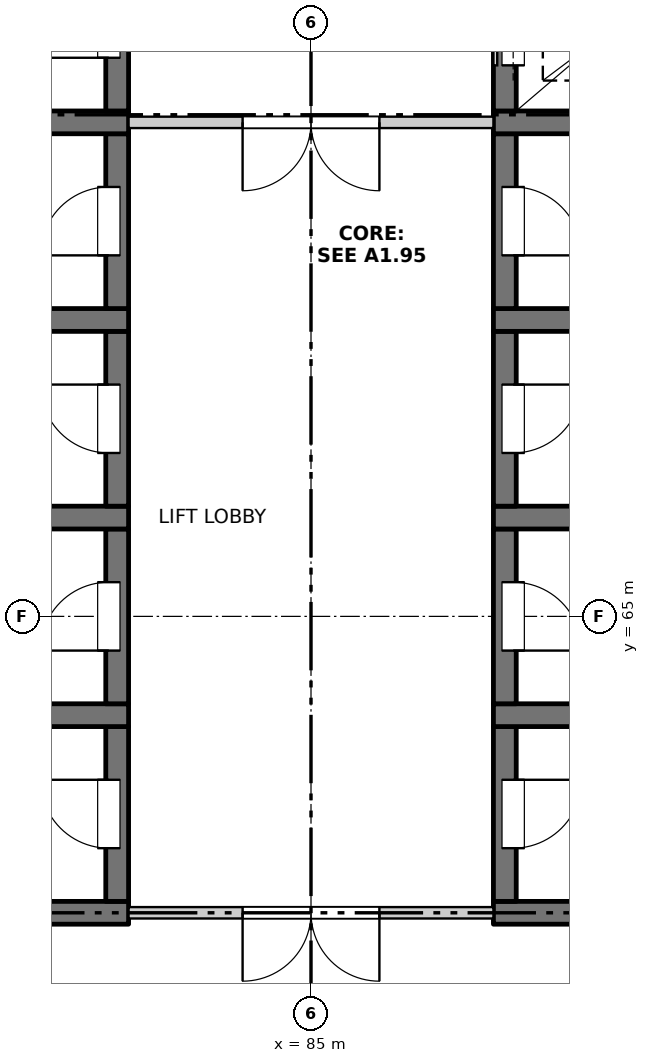
"""IFC4 building model, lengths in metres.
Left out: names, types, materials, properties, quantities, classifications, styles, units other than length and angle.
Written with IfcOpenShell. Run it as: python <this file> out.ifc"""

import sys

from ifc_helpers import new_model, si_unit, direction, frame, frame_2d, origin, place, context, subcontext, project, spatial, rectangle, extrude, element, fill, save


model = new_model("IFC4")
c1 = context("Model", 3, precision=1e-05, world=origin(), true_north=direction((0.0, 1.0)))
c2 = subcontext(c1, "Body", "Model", "MODEL_VIEW")
j1 = project(units=[si_unit("LENGTHUNIT", "METRE"), si_unit("PLANEANGLEUNIT", "RADIAN")], contexts=[c1])
p1 = place(None, origin())
s1 = spatial("IfcSite", under=j1, at=p1, CompositionType="ELEMENT")
p2 = place(p1, origin())
s2 = spatial("IfcBuilding", under=s1, at=p2, CompositionType="ELEMENT")
p3 = place(p2, frame((0.0, 0.0, 169.0)))
s3 = spatial("IfcBuildingStorey", under=s2, at=p3, CompositionType="ELEMENT", Elevation=169.0)
p4 = place(p3, frame((79.6, 61.1, -0.25), z_axis=(0.0, 0.0, 1.0), x_axis=(1.0, 0.0, 0.0)))
e1 = element("IfcWall", 1, at=p4, inside=s3, PredefinedType="SOLIDWALL", context=c2, shape_type="SweptSolid", body=[
    extrude(rectangle(XDim=3.0, YDim=0.3, at=frame_2d((1.5, 0.0))), origin(), (0.0, 0.0, 1.0), 3.35),
])
p5 = place(p3, frame((82.45, 61.25, -0.25), z_axis=(0.0, 0.0, 1.0), x_axis=(0.0, 1.0, 0.0)))
e2 = element("IfcWall", 2, at=p5, inside=s3, PredefinedType="SOLIDWALL", context=c2, shape_type="SweptSolid", body=[
    extrude(rectangle(XDim=2.3, YDim=0.3, at=frame_2d((1.15, 0.0))), origin(), (0.0, 0.0, 1.0), 3.35),
])
p6 = place(p5, frame((0.7, 0.0, 0.25)))
e3 = element("IfcOpeningElement", 3, at=p6, cuts=e2, PredefinedType="OPENING", context=c2, shape_type="SweptSolid", body=[
    extrude(rectangle(XDim=0.9, YDim=2.1, at=frame_2d((0.45, 1.05))), frame((0.0, 0.16, 0.0), z_axis=(0.0, -1.0, 0.0), x_axis=(1.0, 0.0, 0.0)), (0.0, 0.0, 1.0), 0.32),
])
p7 = place(p3, frame((79.6, 63.7, -0.25), z_axis=(0.0, 0.0, 1.0), x_axis=(1.0, 0.0, 0.0)))
e4 = element("IfcWall", 4, at=p7, inside=s3, PredefinedType="SOLIDWALL", context=c2, shape_type="SweptSolid", body=[
    extrude(rectangle(XDim=3.0, YDim=0.3, at=frame_2d((1.5, 0.0))), origin(), (0.0, 0.0, 1.0), 3.35),
])
p8 = place(p3, frame((82.45, 63.85, -0.25), z_axis=(0.0, 0.0, 1.0), x_axis=(0.0, 1.0, 0.0)))
e5 = element("IfcWall", 5, at=p8, inside=s3, PredefinedType="SOLIDWALL", context=c2, shape_type="SweptSolid", body=[
    extrude(rectangle(XDim=2.3, YDim=0.3, at=frame_2d((1.15, 0.0))), origin(), (0.0, 0.0, 1.0), 3.35),
])
p9 = place(p8, frame((0.7, 0.0, 0.25)))
e6 = element("IfcOpeningElement", 6, at=p9, cuts=e5, PredefinedType="OPENING", context=c2, shape_type="SweptSolid", body=[
    extrude(rectangle(XDim=0.9, YDim=2.1, at=frame_2d((0.45, 1.05))), frame((0.0, 0.16, 0.0), z_axis=(0.0, -1.0, 0.0), x_axis=(1.0, 0.0, 0.0)), (0.0, 0.0, 1.0), 0.32),
])
p10 = place(p3, frame((79.6, 66.3, -0.25), z_axis=(0.0, 0.0, 1.0), x_axis=(1.0, 0.0, 0.0)))
e7 = element("IfcWall", 7, at=p10, inside=s3, PredefinedType="SOLIDWALL", context=c2, shape_type="SweptSolid", body=[
    extrude(rectangle(XDim=3.0, YDim=0.3, at=frame_2d((1.5, 0.0))), origin(), (0.0, 0.0, 1.0), 3.35),
])
p11 = place(p3, frame((82.45, 66.45, -0.25), z_axis=(0.0, 0.0, 1.0), x_axis=(0.0, 1.0, 0.0)))
e8 = element("IfcWall", 8, at=p11, inside=s3, PredefinedType="SOLIDWALL", context=c2, shape_type="SweptSolid", body=[
    extrude(rectangle(XDim=2.3, YDim=0.3, at=frame_2d((1.15, 0.0))), origin(), (0.0, 0.0, 1.0), 3.35),
])
p12 = place(p11, frame((0.7, 0.0, 0.25)))
e9 = element("IfcOpeningElement", 9, at=p12, cuts=e8, PredefinedType="OPENING", context=c2, shape_type="SweptSolid", body=[
    extrude(rectangle(XDim=0.9, YDim=2.1, at=frame_2d((0.45, 1.05))), frame((0.0, 0.16, 0.0), z_axis=(0.0, -1.0, 0.0), x_axis=(1.0, 0.0, 0.0)), (0.0, 0.0, 1.0), 0.32),
])
p13 = place(p3, frame((79.6, 68.9, -0.25), z_axis=(0.0, 0.0, 1.0), x_axis=(1.0, 0.0, 0.0)))
e10 = element("IfcWall", 10, at=p13, inside=s3, PredefinedType="SOLIDWALL", context=c2, shape_type="SweptSolid", body=[
    extrude(rectangle(XDim=3.0, YDim=0.3, at=frame_2d((1.5, 0.0))), origin(), (0.0, 0.0, 1.0), 3.35),
])
p14 = place(p3, frame((82.45, 69.05, -0.25), z_axis=(0.0, 0.0, 1.0), x_axis=(0.0, 1.0, 0.0)))
e11 = element("IfcWall", 11, at=p14, inside=s3, PredefinedType="SOLIDWALL", context=c2, shape_type="SweptSolid", body=[
    extrude(rectangle(XDim=2.3, YDim=0.3, at=frame_2d((1.15, 0.0))), origin(), (0.0, 0.0, 1.0), 3.35),
])
p15 = place(p14, frame((0.7, 0.0, 0.25)))
e12 = element("IfcOpeningElement", 12, at=p15, cuts=e11, PredefinedType="OPENING", context=c2, shape_type="SweptSolid", body=[
    extrude(rectangle(XDim=0.9, YDim=2.1, at=frame_2d((0.45, 1.05))), frame((0.0, 0.16, 0.0), z_axis=(0.0, -1.0, 0.0), x_axis=(1.0, 0.0, 0.0)), (0.0, 0.0, 1.0), 0.32),
])
p16 = place(p3, frame((79.6, 71.5, -0.25), z_axis=(0.0, 0.0, 1.0), x_axis=(1.0, 0.0, 0.0)))
e13 = element("IfcWall", 13, at=p16, inside=s3, PredefinedType="SOLIDWALL", context=c2, shape_type="SweptSolid", body=[
    extrude(rectangle(XDim=3.0, YDim=0.3, at=frame_2d((1.5, 0.0))), origin(), (0.0, 0.0, 1.0), 3.35),
])
p17 = place(p3, frame((82.45, 71.65, -0.25), z_axis=(0.0, 0.0, 1.0), x_axis=(0.0, 1.0, 0.0)))
e14 = element("IfcWall", 14, at=p17, inside=s3, PredefinedType="SOLIDWALL", context=c2, shape_type="SweptSolid", body=[
    extrude(rectangle(XDim=2.3, YDim=0.3, at=frame_2d((1.15, 0.0))), origin(), (0.0, 0.0, 1.0), 3.35),
])
p18 = place(p17, frame((0.7, 0.0, 0.25)))
e15 = element("IfcOpeningElement", 15, at=p18, cuts=e14, PredefinedType="OPENING", context=c2, shape_type="SweptSolid", body=[
    extrude(rectangle(XDim=0.9, YDim=2.1, at=frame_2d((0.45, 1.05))), frame((0.0, 0.16, 0.0), z_axis=(0.0, -1.0, 0.0), x_axis=(1.0, 0.0, 0.0)), (0.0, 0.0, 1.0), 0.32),
])
p19 = place(p3, frame((87.4, 61.1, -0.25), z_axis=(0.0, 0.0, 1.0), x_axis=(1.0, 0.0, 0.0)))
e16 = element("IfcWall", 16, at=p19, inside=s3, PredefinedType="SOLIDWALL", context=c2, shape_type="SweptSolid", body=[
    extrude(rectangle(XDim=3.0, YDim=0.3, at=frame_2d((1.5, 0.0))), origin(), (0.0, 0.0, 1.0), 3.35),
])
p20 = place(p3, frame((87.55, 61.25, -0.25), z_axis=(0.0, 0.0, 1.0), x_axis=(0.0, 1.0, 0.0)))
e17 = element("IfcWall", 17, at=p20, inside=s3, PredefinedType="SOLIDWALL", context=c2, shape_type="SweptSolid", body=[
    extrude(rectangle(XDim=2.3, YDim=0.3, at=frame_2d((1.15, 0.0))), origin(), (0.0, 0.0, 1.0), 3.35),
])
p21 = place(p20, frame((0.7, 0.0, 0.25)))
e18 = element("IfcOpeningElement", 18, at=p21, cuts=e17, PredefinedType="OPENING", context=c2, shape_type="SweptSolid", body=[
    extrude(rectangle(XDim=0.9, YDim=2.1, at=frame_2d((0.45, 1.05))), frame((0.0, 0.16, 0.0), z_axis=(0.0, -1.0, 0.0), x_axis=(1.0, 0.0, 0.0)), (0.0, 0.0, 1.0), 0.32),
])
p22 = place(p3, frame((87.4, 63.7, -0.25), z_axis=(0.0, 0.0, 1.0), x_axis=(1.0, 0.0, 0.0)))
e19 = element("IfcWall", 19, at=p22, inside=s3, PredefinedType="SOLIDWALL", context=c2, shape_type="SweptSolid", body=[
    extrude(rectangle(XDim=3.0, YDim=0.3, at=frame_2d((1.5, 0.0))), origin(), (0.0, 0.0, 1.0), 3.35),
])
p23 = place(p3, frame((87.55, 63.85, -0.25), z_axis=(0.0, 0.0, 1.0), x_axis=(0.0, 1.0, 0.0)))
e20 = element("IfcWall", 20, at=p23, inside=s3, PredefinedType="SOLIDWALL", context=c2, shape_type="SweptSolid", body=[
    extrude(rectangle(XDim=2.3, YDim=0.3, at=frame_2d((1.15, 0.0))), origin(), (0.0, 0.0, 1.0), 3.35),
])
p24 = place(p23, frame((0.7, 0.0, 0.25)))
e21 = element("IfcOpeningElement", 21, at=p24, cuts=e20, PredefinedType="OPENING", context=c2, shape_type="SweptSolid", body=[
    extrude(rectangle(XDim=0.9, YDim=2.1, at=frame_2d((0.45, 1.05))), frame((0.0, 0.16, 0.0), z_axis=(0.0, -1.0, 0.0), x_axis=(1.0, 0.0, 0.0)), (0.0, 0.0, 1.0), 0.32),
])
p25 = place(p3, frame((87.4, 66.3, -0.25), z_axis=(0.0, 0.0, 1.0), x_axis=(1.0, 0.0, 0.0)))
e22 = element("IfcWall", 22, at=p25, inside=s3, PredefinedType="SOLIDWALL", context=c2, shape_type="SweptSolid", body=[
    extrude(rectangle(XDim=3.0, YDim=0.3, at=frame_2d((1.5, 0.0))), origin(), (0.0, 0.0, 1.0), 3.35),
])
p26 = place(p3, frame((87.55, 66.45, -0.25), z_axis=(0.0, 0.0, 1.0), x_axis=(0.0, 1.0, 0.0)))
e23 = element("IfcWall", 23, at=p26, inside=s3, PredefinedType="SOLIDWALL", context=c2, shape_type="SweptSolid", body=[
    extrude(rectangle(XDim=2.3, YDim=0.3, at=frame_2d((1.15, 0.0))), origin(), (0.0, 0.0, 1.0), 3.35),
])
p27 = place(p26, frame((0.7, 0.0, 0.25)))
e24 = element("IfcOpeningElement", 24, at=p27, cuts=e23, PredefinedType="OPENING", context=c2, shape_type="SweptSolid", body=[
    extrude(rectangle(XDim=0.9, YDim=2.1, at=frame_2d((0.45, 1.05))), frame((0.0, 0.16, 0.0), z_axis=(0.0, -1.0, 0.0), x_axis=(1.0, 0.0, 0.0)), (0.0, 0.0, 1.0), 0.32),
])
p28 = place(p3, frame((87.4, 68.9, -0.25), z_axis=(0.0, 0.0, 1.0), x_axis=(1.0, 0.0, 0.0)))
e25 = element("IfcWall", 25, at=p28, inside=s3, PredefinedType="SOLIDWALL", context=c2, shape_type="SweptSolid", body=[
    extrude(rectangle(XDim=3.0, YDim=0.3, at=frame_2d((1.5, 0.0))), origin(), (0.0, 0.0, 1.0), 3.35),
])
p29 = place(p3, frame((87.55, 69.05, -0.25), z_axis=(0.0, 0.0, 1.0), x_axis=(0.0, 1.0, 0.0)))
e26 = element("IfcWall", 26, at=p29, inside=s3, PredefinedType="SOLIDWALL", context=c2, shape_type="SweptSolid", body=[
    extrude(rectangle(XDim=2.3, YDim=0.3, at=frame_2d((1.15, 0.0))), origin(), (0.0, 0.0, 1.0), 3.35),
])
p30 = place(p29, frame((0.7, 0.0, 0.25)))
e27 = element("IfcOpeningElement", 27, at=p30, cuts=e26, PredefinedType="OPENING", context=c2, shape_type="SweptSolid", body=[
    extrude(rectangle(XDim=0.9, YDim=2.1, at=frame_2d((0.45, 1.05))), frame((0.0, 0.16, 0.0), z_axis=(0.0, -1.0, 0.0), x_axis=(1.0, 0.0, 0.0)), (0.0, 0.0, 1.0), 0.32),
])
p31 = place(p3, frame((87.4, 71.5, -0.25), z_axis=(0.0, 0.0, 1.0), x_axis=(1.0, 0.0, 0.0)))
e28 = element("IfcWall", 28, at=p31, inside=s3, PredefinedType="SOLIDWALL", context=c2, shape_type="SweptSolid", body=[
    extrude(rectangle(XDim=3.0, YDim=0.3, at=frame_2d((1.5, 0.0))), origin(), (0.0, 0.0, 1.0), 3.35),
])
p32 = place(p3, frame((87.55, 71.65, -0.25), z_axis=(0.0, 0.0, 1.0), x_axis=(0.0, 1.0, 0.0)))
e29 = element("IfcWall", 29, at=p32, inside=s3, PredefinedType="SOLIDWALL", context=c2, shape_type="SweptSolid", body=[
    extrude(rectangle(XDim=2.3, YDim=0.3, at=frame_2d((1.15, 0.0))), origin(), (0.0, 0.0, 1.0), 3.35),
])
p33 = place(p32, frame((0.6, 0.0, 0.25)))
e30 = element("IfcOpeningElement", 30, at=p33, cuts=e29, PredefinedType="OPENING", context=c2, shape_type="SweptSolid", body=[
    extrude(rectangle(XDim=1.1, YDim=2.1, at=frame_2d((0.55, 1.05))), frame((0.0, 0.16, 0.0), z_axis=(0.0, -1.0, 0.0), x_axis=(1.0, 0.0, 0.0)), (0.0, 0.0, 1.0), 0.32),
])
p34 = place(p3, frame((82.6, 61.1, 0.0), z_axis=(0.0, 0.0, 1.0), x_axis=(1.0, 0.0, 0.0)))
e31 = element("IfcWall", 31, at=p34, inside=s3, PredefinedType="PARTITIONING", context=c2, shape_type="SweptSolid", body=[
    extrude(rectangle(XDim=4.8, YDim=0.15, at=frame_2d((2.4, 0.0))), origin(), (0.0, 0.0, 1.0), 3.1),
])
p35 = place(p34, frame((1.5, 0.0, 0.0)))
e32 = element("IfcOpeningElement", 32, at=p35, cuts=e31, PredefinedType="OPENING", context=c2, shape_type="SweptSolid", body=[
    extrude(rectangle(XDim=1.8, YDim=2.1, at=frame_2d((0.9, 1.05))), frame((0.0, 0.085, 0.0), z_axis=(0.0, -1.0, 0.0), x_axis=(1.0, 0.0, 0.0)), (0.0, 0.0, 1.0), 0.17),
])
p36 = place(p3, frame((82.6, 71.5, 0.0), z_axis=(0.0, 0.0, 1.0), x_axis=(1.0, 0.0, 0.0)))
e33 = element("IfcWall", 33, at=p36, inside=s3, PredefinedType="PARTITIONING", context=c2, shape_type="SweptSolid", body=[
    extrude(rectangle(XDim=4.8, YDim=0.15, at=frame_2d((2.4, 0.0))), origin(), (0.0, 0.0, 1.0), 3.1),
])
p37 = place(p36, frame((1.5, 0.0, 0.0)))
e34 = element("IfcOpeningElement", 34, at=p37, cuts=e33, PredefinedType="OPENING", context=c2, shape_type="SweptSolid", body=[
    extrude(rectangle(XDim=1.8, YDim=2.1, at=frame_2d((0.9, 1.05))), frame((0.0, 0.085, 0.0), z_axis=(0.0, -1.0, 0.0), x_axis=(1.0, 0.0, 0.0)), (0.0, 0.0, 1.0), 0.17),
])
p38 = place(p35, origin())
e35 = element("IfcDoor", 35, at=p38, inside=s3, OperationType="DOUBLE_DOOR_SINGLE_SWING", PredefinedType="DOOR", context=c2, shape_type="SweptSolid", body=[
    extrude(rectangle(XDim=1.8, YDim=2.1, at=frame_2d((0.9, 1.05))), frame((0.0, 0.025, 0.0), z_axis=(0.0, -1.0, 0.0), x_axis=(1.0, 0.0, 0.0)), (0.0, 0.0, 1.0), 0.05),
])
fill(e32, e35)
p39 = place(p6, origin())
e36 = element("IfcDoor", 36, at=p39, inside=s3, OperationType="SINGLE_SWING_RIGHT", PredefinedType="DOOR", context=c2, shape_type="SweptSolid", body=[
    extrude(rectangle(XDim=0.9, YDim=2.1, at=frame_2d((0.45, 1.05))), frame((0.0, 0.135, 0.0), z_axis=(0.0, -1.0, 0.0), x_axis=(1.0, 0.0, 0.0)), (0.0, 0.0, 1.0), 0.05),
])
fill(e3, e36)
p40 = place(p21, origin())
e37 = element("IfcDoor", 37, at=p40, inside=s3, OperationType="SINGLE_SWING_LEFT", PredefinedType="DOOR", context=c2, shape_type="SweptSolid", body=[
    extrude(rectangle(XDim=0.9, YDim=2.1, at=frame_2d((0.45, 1.05))), frame((0.0, -0.085, 0.0), z_axis=(0.0, -1.0, 0.0), x_axis=(1.0, 0.0, 0.0)), (0.0, 0.0, 1.0), 0.05),
])
fill(e18, e37)
p41 = place(p9, origin())
e38 = element("IfcDoor", 38, at=p41, inside=s3, OperationType="SINGLE_SWING_LEFT", PredefinedType="DOOR", context=c2, shape_type="SweptSolid", body=[
    extrude(rectangle(XDim=0.9, YDim=2.1, at=frame_2d((0.45, 1.05))), frame((0.0, 0.135, 0.0), z_axis=(0.0, -1.0, 0.0), x_axis=(1.0, 0.0, 0.0)), (0.0, 0.0, 1.0), 0.05),
])
fill(e6, e38)
p42 = place(p24, origin())
e39 = element("IfcDoor", 39, at=p42, inside=s3, OperationType="SINGLE_SWING_RIGHT", PredefinedType="DOOR", context=c2, shape_type="SweptSolid", body=[
    extrude(rectangle(XDim=0.9, YDim=2.1, at=frame_2d((0.45, 1.05))), frame((0.0, -0.085, 0.0), z_axis=(0.0, -1.0, 0.0), x_axis=(1.0, 0.0, 0.0)), (0.0, 0.0, 1.0), 0.05),
])
fill(e21, e39)
p43 = place(p12, origin())
e40 = element("IfcDoor", 40, at=p43, inside=s3, OperationType="SINGLE_SWING_RIGHT", PredefinedType="DOOR", context=c2, shape_type="SweptSolid", body=[
    extrude(rectangle(XDim=0.9, YDim=2.1, at=frame_2d((0.45, 1.05))), frame((0.0, 0.135, 0.0), z_axis=(0.0, -1.0, 0.0), x_axis=(1.0, 0.0, 0.0)), (0.0, 0.0, 1.0), 0.05),
])
fill(e9, e40)
p44 = place(p27, origin())
e41 = element("IfcDoor", 41, at=p44, inside=s3, OperationType="SINGLE_SWING_LEFT", PredefinedType="DOOR", context=c2, shape_type="SweptSolid", body=[
    extrude(rectangle(XDim=0.9, YDim=2.1, at=frame_2d((0.45, 1.05))), frame((0.0, -0.085, 0.0), z_axis=(0.0, -1.0, 0.0), x_axis=(1.0, 0.0, 0.0)), (0.0, 0.0, 1.0), 0.05),
])
fill(e24, e41)
p45 = place(p15, origin())
e42 = element("IfcDoor", 42, at=p45, inside=s3, OperationType="SINGLE_SWING_LEFT", PredefinedType="DOOR", context=c2, shape_type="SweptSolid", body=[
    extrude(rectangle(XDim=0.9, YDim=2.1, at=frame_2d((0.45, 1.05))), frame((0.0, 0.135, 0.0), z_axis=(0.0, -1.0, 0.0), x_axis=(1.0, 0.0, 0.0)), (0.0, 0.0, 1.0), 0.05),
])
fill(e12, e42)
p46 = place(p30, origin())
e43 = element("IfcDoor", 43, at=p46, inside=s3, OperationType="SINGLE_SWING_RIGHT", PredefinedType="DOOR", context=c2, shape_type="SweptSolid", body=[
    extrude(rectangle(XDim=0.9, YDim=2.1, at=frame_2d((0.45, 1.05))), frame((0.0, -0.085, 0.0), z_axis=(0.0, -1.0, 0.0), x_axis=(1.0, 0.0, 0.0)), (0.0, 0.0, 1.0), 0.05),
])
fill(e27, e43)
p47 = place(p37, origin())
e44 = element("IfcDoor", 44, at=p47, inside=s3, OperationType="DOUBLE_DOOR_SINGLE_SWING", PredefinedType="DOOR", context=c2, shape_type="SweptSolid", body=[
    extrude(rectangle(XDim=1.8, YDim=2.1, at=frame_2d((0.9, 1.05))), frame((0.0, 0.025, 0.0), z_axis=(0.0, -1.0, 0.0), x_axis=(1.0, 0.0, 0.0)), (0.0, 0.0, 1.0), 0.05),
])
fill(e34, e44)
p48 = place(p18, origin())
e45 = element("IfcDoor", 45, at=p48, inside=s3, OperationType="SINGLE_SWING_LEFT", PredefinedType="DOOR", context=c2, shape_type="SweptSolid", body=[
    extrude(rectangle(XDim=0.9, YDim=2.1, at=frame_2d((0.45, 1.05))), frame((0.0, 0.135, 0.0), z_axis=(0.0, -1.0, 0.0), x_axis=(1.0, 0.0, 0.0)), (0.0, 0.0, 1.0), 0.05),
])
fill(e15, e45)
p49 = place(p33, origin())
e46 = element("IfcDoor", 46, at=p49, inside=s3, OperationType="SLIDING_TO_LEFT", PredefinedType="DOOR", context=c2, shape_type="SweptSolid", body=[
    extrude(rectangle(XDim=1.1, YDim=2.1, at=frame_2d((0.55, 1.05))), frame((0.0, -0.085, 0.0), z_axis=(0.0, -1.0, 0.0), x_axis=(1.0, 0.0, 0.0)), (0.0, 0.0, 1.0), 0.05),
])
fill(e30, e46)
save(model, sys.argv[1])
